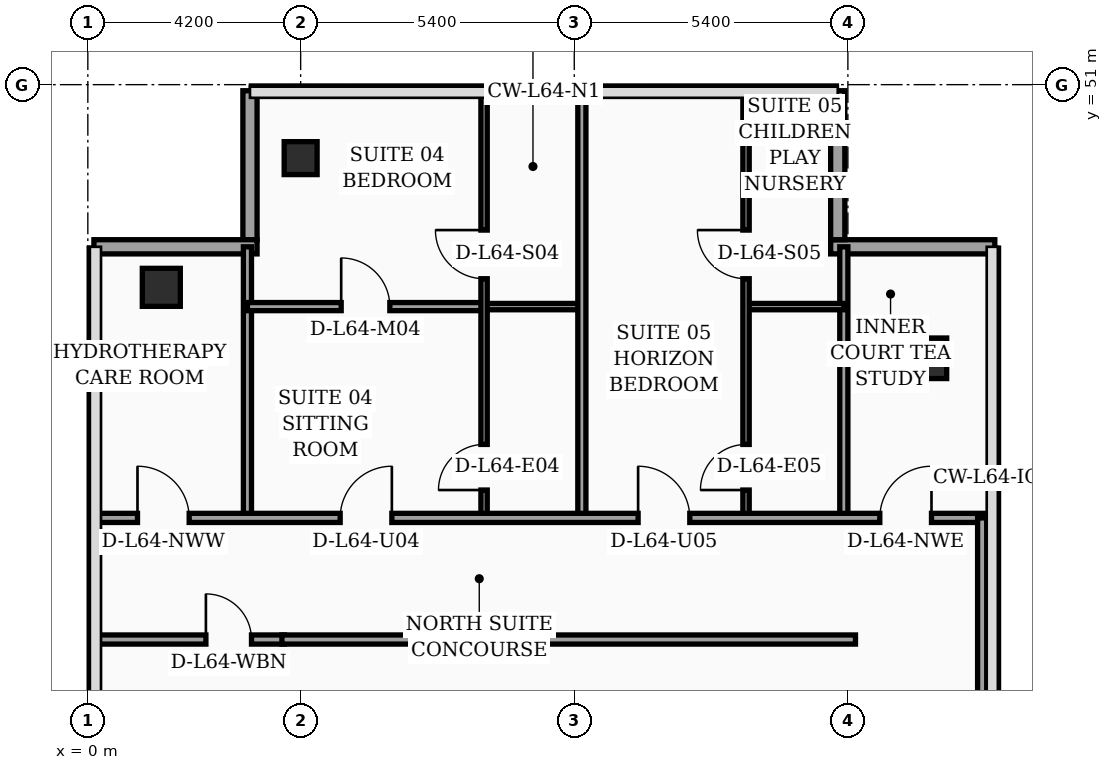
"""IFC4 building model, lengths in metres.
Left out: names, types, materials, properties, quantities, classifications, styles, units other than length and angle.
Written with IfcOpenShell. Run it as: python <this file> out.ifc"""

import sys

from ifc_helpers import new_model, si_unit, direction, frame, frame_2d, origin, origin_2d, place, context, subcontext, project, spatial, rectangle, hollow_rectangle, extrude, element, fill, save


model = new_model("IFC4")
c1 = context("Model", 3, precision=1e-05, world=origin(), true_north=direction((0.0, 1.0)))
c2 = subcontext(c1, "Body", "Model", "MODEL_VIEW")
j1 = project(units=[si_unit("LENGTHUNIT", "METRE"), si_unit("PLANEANGLEUNIT", "RADIAN")], contexts=[c1])
p1 = place(None, origin())
s1 = spatial("IfcSite", under=j1, at=p1, CompositionType="ELEMENT")
p2 = place(p1, origin())
s2 = spatial("IfcBuilding", under=s1, at=p2, CompositionType="ELEMENT")
p3 = place(p2, frame((0.0, 0.0, 259.0)))
s3 = spatial("IfcBuildingStorey", under=s2, at=p3, CompositionType="ELEMENT", Elevation=259.0)
p4 = place(p3, frame((1.45, 47.0, 0.0), z_axis=(0.0, 0.0, 1.0), x_axis=(1.0, 0.0, 0.0)))
e1 = element("IfcColumn", 1, at=p4, inside=s3, PredefinedType="COLUMN", context=c2, shape_type="SweptSolid", body=[
    extrude(hollow_rectangle(XDim=0.75, YDim=0.75, WallThickness=0.032, at=origin_2d()), origin(), (0.0, 0.0, 1.0), 4.05),
])
p5 = place(p3, frame((4.2, 49.55, 0.0), z_axis=(0.0, 0.0, 1.0), x_axis=(1.0, 0.0, 0.0)))
e2 = element("IfcColumn", 2, at=p5, inside=s3, PredefinedType="COLUMN", context=c2, shape_type="SweptSolid", body=[
    extrude(hollow_rectangle(XDim=0.65, YDim=0.65, WallThickness=0.028, at=origin_2d()), origin(), (0.0, 0.0, 1.0), 4.05),
])
p6 = place(p3, frame((16.55, 45.6, 0.0), z_axis=(0.0, 0.0, 1.0), x_axis=(1.0, 0.0, 0.0)))
e3 = element("IfcColumn", 3, at=p6, inside=s3, PredefinedType="COLUMN", context=c2, shape_type="SweptSolid", body=[
    extrude(rectangle(XDim=0.8, YDim=0.8, at=origin_2d()), origin(), (0.0, 0.0, 1.0), 4.05),
])
p7 = place(p3, frame((17.9, 47.8, 0.0), z_axis=(0.0, 0.0, 1.0), x_axis=(-1.0, 0.0, 0.0)))
e4 = element("IfcWall", 4, at=p7, inside=s3, PredefinedType="SOLIDWALL", context=c2, shape_type="SweptSolid", body=[
    extrude(rectangle(XDim=3.24, YDim=0.28, at=frame_2d((1.62, 0.0))), origin(), (0.0, 0.0, 1.0), 4.05),
])
p8 = place(p3, frame((14.8, 47.94, 0.0), z_axis=(0.0, 0.0, 1.0), x_axis=(0.0, 1.0, 0.0)))
e5 = element("IfcWall", 5, at=p8, inside=s3, PredefinedType="SOLIDWALL", context=c2, shape_type="SweptSolid", body=[
    extrude(rectangle(XDim=2.94, YDim=0.28, at=frame_2d((1.47, 0.0))), origin(), (0.0, 0.0, 1.0), 4.05),
])
p9 = place(p3, frame((3.2, 50.88, 0.0), z_axis=(0.0, 0.0, 1.0), x_axis=(0.0, -1.0, 0.0)))
e6 = element("IfcWall", 6, at=p9, inside=s3, PredefinedType="SOLIDWALL", context=c2, shape_type="SweptSolid", body=[
    extrude(rectangle(XDim=2.94, YDim=0.28, at=frame_2d((1.47, 0.0))), origin(), (0.0, 0.0, 1.0), 3.6),
])
p10 = place(p3, frame((3.34, 47.8, 0.0), z_axis=(0.0, 0.0, 1.0), x_axis=(-1.0, 0.0, 0.0)))
e7 = element("IfcWall", 7, at=p10, inside=s3, PredefinedType="SOLIDWALL", context=c2, shape_type="SweptSolid", body=[
    extrude(rectangle(XDim=3.22, YDim=0.28, at=frame_2d((1.61, 0.0))), origin(), (0.0, 0.0, 1.0), 3.6),
])
p11 = place(p3, frame((0.08, 40.05, 0.0), z_axis=(0.0, 0.0, 1.0), x_axis=(1.0, 0.0, 0.0)))
e8 = element("IfcWall", 8, at=p11, inside=s3, PredefinedType="PARTITIONING", context=c2, shape_type="SweptSolid", body=[
    extrude(rectangle(XDim=3.8, YDim=0.18, at=frame_2d((1.9, 0.0))), origin(), (0.0, 0.0, 1.0), 3.5),
])
p12 = place(p11, frame((2.25, 0.0, 0.0)))
e9 = element("IfcOpeningElement", 9, at=p12, cuts=e8, PredefinedType="OPENING", context=c2, shape_type="SweptSolid", body=[
    extrude(rectangle(XDim=0.9, YDim=2.15, at=frame_2d((0.45, 1.075))), frame((0.0, 0.1, 0.0), z_axis=(0.0, -1.0, 0.0), x_axis=(1.0, 0.0, 0.0)), (0.0, 0.0, 1.0), 0.2),
])
p13 = place(p3, frame((3.15, 42.45, 0.0), z_axis=(0.0, 0.0, 1.0), x_axis=(0.0, 1.0, 0.0)))
e10 = element("IfcWall", 10, at=p13, inside=s3, PredefinedType="PARTITIONING", context=c2, shape_type="SweptSolid", body=[
    extrude(rectangle(XDim=5.35, YDim=0.16, at=frame_2d((2.675, 0.0))), origin(), (0.0, 0.0, 1.0), 3.65),
])
p14 = place(p3, frame((14.92, 42.45, 0.0), z_axis=(0.0, 0.0, 1.0), x_axis=(0.0, 1.0, 0.0)))
e11 = element("IfcWall", 11, at=p14, inside=s3, PredefinedType="PARTITIONING", context=c2, shape_type="SweptSolid", body=[
    extrude(rectangle(XDim=5.35, YDim=0.16, at=frame_2d((2.675, 0.0))), origin(), (0.0, 0.0, 1.0), 3.6),
])
p15 = place(p3, frame((7.82, 46.62, 0.0), z_axis=(0.0, 0.0, 1.0), x_axis=(1.0, 0.0, 0.0)))
e12 = element("IfcWall", 12, at=p15, inside=s3, PredefinedType="PARTITIONING", context=c2, shape_type="SweptSolid", body=[
    extrude(rectangle(XDim=1.93, YDim=0.125, at=frame_2d((0.965, 0.0))), origin(), (0.0, 0.0, 1.0), 4.05),
])
p16 = place(p3, frame((3.15, 46.62, 0.0), z_axis=(0.0, 0.0, 1.0), x_axis=(1.0, 0.0, 0.0)))
e13 = element("IfcWall", 13, at=p16, inside=s3, PredefinedType="PARTITIONING", context=c2, shape_type="SweptSolid", body=[
    extrude(rectangle(XDim=4.67, YDim=0.16, at=frame_2d((2.335, 0.0))), origin(), (0.0, 0.0, 1.0), 3.5),
])
p17 = place(p16, frame((1.85, 0.0, 0.0)))
e14 = element("IfcOpeningElement", 14, at=p17, cuts=e13, PredefinedType="OPENING", context=c2, shape_type="SweptSolid", body=[
    extrude(rectangle(XDim=0.96, YDim=2.2, at=frame_2d((0.48, 1.1))), frame((0.0, 0.09, 0.0), z_axis=(0.0, -1.0, 0.0), x_axis=(1.0, 0.0, 0.0)), (0.0, 0.0, 1.0), 0.18),
])
p18 = place(p3, frame((7.82, 42.45, 0.0), z_axis=(0.0, 0.0, 1.0), x_axis=(0.0, 1.0, 0.0)))
e15 = element("IfcWall", 15, at=p18, inside=s3, PredefinedType="PARTITIONING", context=c2, shape_type="SweptSolid", body=[
    extrude(rectangle(XDim=8.49, YDim=0.125, at=frame_2d((4.245, 0.0))), origin(), (0.0, 0.0, 1.0), 3.6),
])
p19 = place(p18, frame((0.55, 0.0, 0.0)))
e16 = element("IfcOpeningElement", 16, at=p19, cuts=e15, PredefinedType="OPENING", context=c2, shape_type="SweptSolid", body=[
    extrude(rectangle(XDim=0.9, YDim=2.15, at=frame_2d((0.45, 1.075))), frame((0.0, 0.073, 0.0), z_axis=(0.0, -1.0, 0.0), x_axis=(1.0, 0.0, 0.0)), (0.0, 0.0, 1.0), 0.145),
])
p20 = place(p18, frame((4.72, 0.0, 0.0)))
e17 = element("IfcOpeningElement", 17, at=p20, cuts=e15, PredefinedType="OPENING", context=c2, shape_type="SweptSolid", body=[
    extrude(rectangle(XDim=0.96, YDim=2.2, at=frame_2d((0.48, 1.1))), frame((0.0, 0.073, 0.0), z_axis=(0.0, -1.0, 0.0), x_axis=(1.0, 0.0, 0.0)), (0.0, 0.0, 1.0), 0.145),
])
p21 = place(p3, frame((12.99, 46.62, 0.0), z_axis=(0.0, 0.0, 1.0), x_axis=(1.0, 0.0, 0.0)))
e18 = element("IfcWall", 18, at=p21, inside=s3, PredefinedType="PARTITIONING", context=c2, shape_type="SweptSolid", body=[
    extrude(rectangle(XDim=1.93, YDim=0.125, at=frame_2d((0.965, 0.0))), origin(), (0.0, 0.0, 1.0), 3.6),
])
p22 = place(p3, frame((12.99, 42.45, 0.0), z_axis=(0.0, 0.0, 1.0), x_axis=(0.0, 1.0, 0.0)))
e19 = element("IfcWall", 19, at=p22, inside=s3, PredefinedType="PARTITIONING", context=c2, shape_type="SweptSolid", body=[
    extrude(rectangle(XDim=8.49, YDim=0.125, at=frame_2d((4.245, 0.0))), origin(), (0.0, 0.0, 1.0), 3.6),
])
p23 = place(p22, frame((0.55, 0.0, 0.0)))
e20 = element("IfcOpeningElement", 20, at=p23, cuts=e19, PredefinedType="OPENING", context=c2, shape_type="SweptSolid", body=[
    extrude(rectangle(XDim=0.9, YDim=2.15, at=frame_2d((0.45, 1.075))), frame((0.0, 0.073, 0.0), z_axis=(0.0, -1.0, 0.0), x_axis=(1.0, 0.0, 0.0)), (0.0, 0.0, 1.0), 0.145),
])
p24 = place(p22, frame((4.72, 0.0, 0.0)))
e21 = element("IfcOpeningElement", 21, at=p24, cuts=e19, PredefinedType="OPENING", context=c2, shape_type="SweptSolid", body=[
    extrude(rectangle(XDim=0.96, YDim=2.2, at=frame_2d((0.48, 1.1))), frame((0.0, 0.073, 0.0), z_axis=(0.0, -1.0, 0.0), x_axis=(1.0, 0.0, 0.0)), (0.0, 0.0, 1.0), 0.145),
])
p25 = place(p3, frame((9.75, 42.45, 0.0), z_axis=(0.0, 0.0, 1.0), x_axis=(0.0, 1.0, 0.0)))
e22 = element("IfcWall", 22, at=p25, inside=s3, PredefinedType="PARTITIONING", context=c2, shape_type="SweptSolid", body=[
    extrude(rectangle(XDim=8.49, YDim=0.16, at=frame_2d((4.245, 0.0))), origin(), (0.0, 0.0, 1.0), 3.6),
])
p26 = place(p3, frame((0.08, 42.45, 0.0), z_axis=(0.0, 0.0, 1.0), x_axis=(1.0, 0.0, 0.0)))
e23 = element("IfcWall", 23, at=p26, inside=s3, PredefinedType="PARTITIONING", context=c2, shape_type="SweptSolid", body=[
    extrude(rectangle(XDim=17.77, YDim=0.18, at=frame_2d((8.885, 0.0))), origin(), (0.0, 0.0, 1.0), 3.5),
])
p27 = place(p26, frame((0.9, 0.0, 0.0)))
e24 = element("IfcOpeningElement", 24, at=p27, cuts=e23, PredefinedType="OPENING", context=c2, shape_type="SweptSolid", body=[
    extrude(rectangle(XDim=1.02, YDim=2.2, at=frame_2d((0.51, 1.1))), frame((0.0, 0.1, 0.0), z_axis=(0.0, -1.0, 0.0), x_axis=(1.0, 0.0, 0.0)), (0.0, 0.0, 1.0), 0.2),
])
p28 = place(p26, frame((4.9, 0.0, 0.0)))
e25 = element("IfcOpeningElement", 25, at=p28, cuts=e23, PredefinedType="OPENING", context=c2, shape_type="SweptSolid", body=[
    extrude(rectangle(XDim=1.02, YDim=2.2, at=frame_2d((0.51, 1.1))), frame((0.0, 0.1, 0.0), z_axis=(0.0, -1.0, 0.0), x_axis=(1.0, 0.0, 0.0)), (0.0, 0.0, 1.0), 0.2),
])
p29 = place(p26, frame((10.78, 0.0, 0.0)))
e26 = element("IfcOpeningElement", 26, at=p29, cuts=e23, PredefinedType="OPENING", context=c2, shape_type="SweptSolid", body=[
    extrude(rectangle(XDim=1.02, YDim=2.2, at=frame_2d((0.51, 1.1))), frame((0.0, 0.1, 0.0), z_axis=(0.0, -1.0, 0.0), x_axis=(1.0, 0.0, 0.0)), (0.0, 0.0, 1.0), 0.2),
])
p30 = place(p26, frame((15.55, 0.0, 0.0)))
e27 = element("IfcOpeningElement", 27, at=p30, cuts=e23, PredefinedType="OPENING", context=c2, shape_type="SweptSolid", body=[
    extrude(rectangle(XDim=1.02, YDim=2.2, at=frame_2d((0.51, 1.1))), frame((0.0, 0.1, 0.0), z_axis=(0.0, -1.0, 0.0), x_axis=(1.0, 0.0, 0.0)), (0.0, 0.0, 1.0), 0.2),
])
p31 = place(p3, frame((17.65, 24.3, 0.0), z_axis=(0.0, 0.0, 1.0), x_axis=(0.0, 1.0, 0.0)))
e28 = element("IfcWall", 28, at=p31, inside=s3, PredefinedType="PARTITIONING", context=c2, shape_type="SweptSolid", body=[
    extrude(rectangle(XDim=18.15, YDim=0.18, at=frame_2d((9.075, 0.0))), origin(), (0.0, 0.0, 1.0), 3.5),
])
p32 = place(p31, frame((3.2, 0.0, 0.0)))
e29 = element("IfcOpeningElement", 29, at=p32, cuts=e28, PredefinedType="OPENING", context=c2, shape_type="SweptSolid", body=[
    extrude(rectangle(XDim=1.02, YDim=2.2, at=frame_2d((0.51, 1.1))), frame((0.0, 0.1, 0.0), z_axis=(0.0, -1.0, 0.0), x_axis=(1.0, 0.0, 0.0)), (0.0, 0.0, 1.0), 0.2),
])
p33 = place(p3, frame((3.83, 40.05, 0.0), z_axis=(0.0, 0.0, 1.0), x_axis=(1.0, 0.0, 0.0)))
e30 = element("IfcWall", 30, at=p33, inside=s3, PredefinedType="PARTITIONING", context=c2, shape_type="SweptSolid", body=[
    extrude(rectangle(XDim=11.32, YDim=0.18, at=frame_2d((5.66, 0.0))), origin(), (0.0, 0.0, 1.0), 3.5),
])
p34 = place(p12, origin())
e31 = element("IfcDoor", 31, at=p34, inside=s3, OperationType="SINGLE_SWING_LEFT", PredefinedType="DOOR", context=c2, shape_type="SweptSolid", body=[
    extrude(rectangle(XDim=0.9, YDim=2.15, at=frame_2d((0.45, 1.075))), frame((0.0, 0.025, 0.0), z_axis=(0.0, -1.0, 0.0), x_axis=(1.0, 0.0, 0.0)), (0.0, 0.0, 1.0), 0.05),
])
fill(e9, e31)
p35 = place(p17, origin())
e32 = element("IfcDoor", 32, at=p35, inside=s3, OperationType="SINGLE_SWING_LEFT", PredefinedType="DOOR", context=c2, shape_type="SweptSolid", body=[
    extrude(rectangle(XDim=0.96, YDim=2.2, at=frame_2d((0.48, 1.1))), frame((0.0, 0.025, 0.0), z_axis=(0.0, -1.0, 0.0), x_axis=(1.0, 0.0, 0.0)), (0.0, 0.0, 1.0), 0.05),
])
fill(e14, e32)
p36 = place(p19, origin())
e33 = element("IfcDoor", 33, at=p36, inside=s3, OperationType="SINGLE_SWING_LEFT", PredefinedType="DOOR", context=c2, shape_type="SweptSolid", body=[
    extrude(rectangle(XDim=0.9, YDim=2.15, at=frame_2d((0.45, 1.075))), frame((0.0, 0.025, 0.0), z_axis=(0.0, -1.0, 0.0), x_axis=(1.0, 0.0, 0.0)), (0.0, 0.0, 1.0), 0.05),
])
fill(e16, e33)
p37 = place(p20, origin())
e34 = element("IfcDoor", 34, at=p37, inside=s3, OperationType="SINGLE_SWING_RIGHT", PredefinedType="DOOR", context=c2, shape_type="SweptSolid", body=[
    extrude(rectangle(XDim=0.96, YDim=2.2, at=frame_2d((0.48, 1.1))), frame((0.0, 0.025, 0.0), z_axis=(0.0, -1.0, 0.0), x_axis=(1.0, 0.0, 0.0)), (0.0, 0.0, 1.0), 0.05),
])
fill(e17, e34)
p38 = place(p23, origin())
e35 = element("IfcDoor", 35, at=p38, inside=s3, OperationType="SINGLE_SWING_LEFT", PredefinedType="DOOR", context=c2, shape_type="SweptSolid", body=[
    extrude(rectangle(XDim=0.9, YDim=2.15, at=frame_2d((0.45, 1.075))), frame((0.0, 0.025, 0.0), z_axis=(0.0, -1.0, 0.0), x_axis=(1.0, 0.0, 0.0)), (0.0, 0.0, 1.0), 0.05),
])
fill(e20, e35)
p39 = place(p24, origin())
e36 = element("IfcDoor", 36, at=p39, inside=s3, OperationType="SINGLE_SWING_RIGHT", PredefinedType="DOOR", context=c2, shape_type="SweptSolid", body=[
    extrude(rectangle(XDim=0.96, YDim=2.2, at=frame_2d((0.48, 1.1))), frame((0.0, 0.025, 0.0), z_axis=(0.0, -1.0, 0.0), x_axis=(1.0, 0.0, 0.0)), (0.0, 0.0, 1.0), 0.05),
])
fill(e21, e36)
p40 = place(p27, origin())
e37 = element("IfcDoor", 37, at=p40, inside=s3, OperationType="SINGLE_SWING_LEFT", PredefinedType="DOOR", context=c2, shape_type="SweptSolid", body=[
    extrude(rectangle(XDim=1.02, YDim=2.2, at=frame_2d((0.51, 1.1))), frame((0.0, 0.025, 0.0), z_axis=(0.0, -1.0, 0.0), x_axis=(1.0, 0.0, 0.0)), (0.0, 0.0, 1.0), 0.05),
])
fill(e24, e37)
p41 = place(p28, origin())
e38 = element("IfcDoor", 38, at=p41, inside=s3, OperationType="SINGLE_SWING_RIGHT", PredefinedType="DOOR", context=c2, shape_type="SweptSolid", body=[
    extrude(rectangle(XDim=1.02, YDim=2.2, at=frame_2d((0.51, 1.1))), frame((0.0, 0.025, 0.0), z_axis=(0.0, -1.0, 0.0), x_axis=(1.0, 0.0, 0.0)), (0.0, 0.0, 1.0), 0.05),
])
fill(e25, e38)
p42 = place(p29, origin())
e39 = element("IfcDoor", 39, at=p42, inside=s3, OperationType="SINGLE_SWING_LEFT", PredefinedType="DOOR", context=c2, shape_type="SweptSolid", body=[
    extrude(rectangle(XDim=1.02, YDim=2.2, at=frame_2d((0.51, 1.1))), frame((0.0, 0.025, 0.0), z_axis=(0.0, -1.0, 0.0), x_axis=(1.0, 0.0, 0.0)), (0.0, 0.0, 1.0), 0.05),
])
fill(e26, e39)
p43 = place(p30, origin())
e40 = element("IfcDoor", 40, at=p43, inside=s3, OperationType="SINGLE_SWING_RIGHT", PredefinedType="DOOR", context=c2, shape_type="SweptSolid", body=[
    extrude(rectangle(XDim=1.02, YDim=2.2, at=frame_2d((0.51, 1.1))), frame((0.0, 0.025, 0.0), z_axis=(0.0, -1.0, 0.0), x_axis=(1.0, 0.0, 0.0)), (0.0, 0.0, 1.0), 0.05),
])
fill(e27, e40)
save(model, sys.argv[1])
